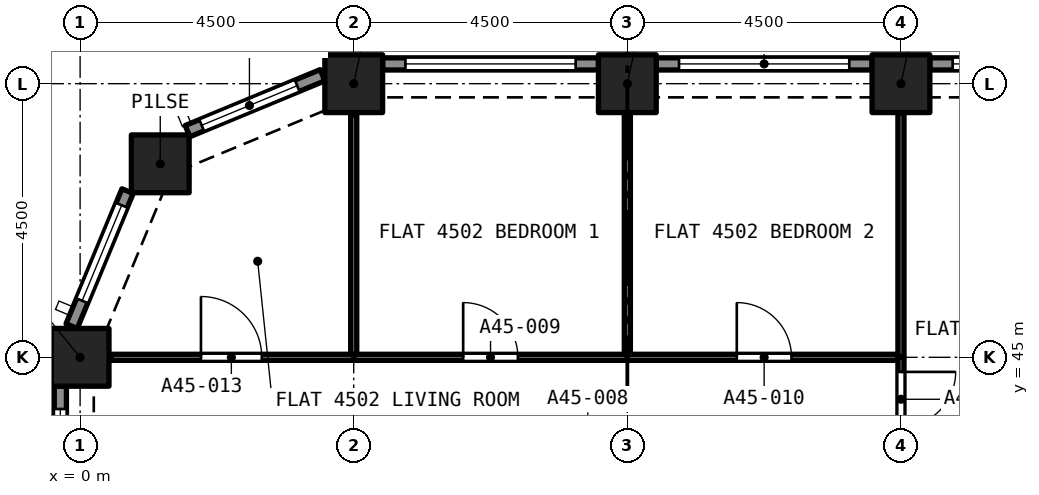
"""IFC4 building model, lengths in metres.
Left out: names, types, materials, properties, quantities, classifications, styles, units other than length and angle.
Written with IfcOpenShell. Run it as: python <this file> out.ifc"""

import sys

from ifc_helpers import new_model, si_unit, direction, frame, frame_2d, origin, origin_2d, place, context, subcontext, project, spatial, rectangle, extrude, element, fill, save


model = new_model("IFC4")
c1 = context("Model", 3, precision=1e-05, world=origin(), true_north=direction((0.0, 1.0)))
c2 = subcontext(c1, "Body", "Model", "MODEL_VIEW")
j1 = project(units=[si_unit("LENGTHUNIT", "METRE"), si_unit("PLANEANGLEUNIT", "RADIAN")], contexts=[c1])
p1 = place(None, origin())
s1 = spatial("IfcSite", under=j1, at=p1, CompositionType="ELEMENT")
p2 = place(p1, origin())
s2 = spatial("IfcBuilding", under=s1, at=p2, CompositionType="ELEMENT")
p3 = place(p2, frame((0.0, 0.0, 163.8)))
s3 = spatial("IfcBuildingStorey", under=s2, at=p3, CompositionType="ELEMENT", Elevation=163.8)
for number, where, z_axis, x_axis in (
    (1, (0.0, 45.0, 0.0), (0.0, 0.0, 1.0), (1.0, 0.0, 0.0)),
    (2, (1.318, 48.182, 0.0), (0.0, 0.0, 1.0), (1.0, 0.0, 0.0)),
    (3, (4.5, 49.5, 0.0), (0.0, 0.0, 1.0), (1.0, 0.0, 0.0)),
    (4, (9.0, 49.5, 0.0), (0.0, 0.0, 1.0), (1.0, 0.0, 0.0)),
    (5, (13.5, 49.5, 0.0), (0.0, 0.0, 1.0), (1.0, 0.0, 0.0)),
):
    element("IfcColumn", number, at=place(p3, frame(where, z_axis=z_axis, x_axis=x_axis)), inside=s3, PredefinedType="COLUMN", context=c2, shape_type="SweptSolid", body=[
        extrude(rectangle(XDim=0.95, YDim=0.95, at=origin_2d()), origin(), (0.0, 0.0, 1.0), 4.4),
    ])
p4 = place(p3, frame((13.975, 49.825, 0.0), z_axis=(0.0, 0.0, 1.0), x_axis=(1.0, 0.0, 0.0)))
e6 = element("IfcWall", 6, at=p4, inside=s3, PredefinedType="SOLIDWALL", context=c2, shape_type="SweptSolid", body=[
    extrude(rectangle(XDim=3.55, YDim=0.2, at=frame_2d((1.775, 0.0))), origin(), (0.0, 0.0, 1.0), 4.4),
])
p5 = place(p4, frame((0.375, 0.0, 0.45)))
e7 = element("IfcOpeningElement", 7, at=p5, cuts=e6, PredefinedType="OPENING", context=c2, shape_type="SweptSolid", body=[
    extrude(rectangle(XDim=2.8, YDim=2.55, at=frame_2d((1.4, 1.275))), frame((0.0, 0.11, 0.0), z_axis=(0.0, -1.0, 0.0), x_axis=(1.0, 0.0, 0.0)), (0.0, 0.0, 1.0), 0.22),
])
p6 = place(p3, frame((9.475, 49.825, 0.0), z_axis=(0.0, 0.0, 1.0), x_axis=(1.0, 0.0, 0.0)))
e8 = element("IfcWall", 8, at=p6, inside=s3, PredefinedType="SOLIDWALL", context=c2, shape_type="SweptSolid", body=[
    extrude(rectangle(XDim=3.55, YDim=0.2, at=frame_2d((1.775, 0.0))), origin(), (0.0, 0.0, 1.0), 4.4),
])
p7 = place(p6, frame((0.375, 0.0, 0.45)))
e9 = element("IfcOpeningElement", 9, at=p7, cuts=e8, PredefinedType="OPENING", context=c2, shape_type="SweptSolid", body=[
    extrude(rectangle(XDim=2.8, YDim=2.55, at=frame_2d((1.4, 1.275))), frame((0.0, 0.11, 0.0), z_axis=(0.0, -1.0, 0.0), x_axis=(1.0, 0.0, 0.0)), (0.0, 0.0, 1.0), 0.22),
])
p8 = place(p3, frame((4.975, 49.825, 0.0), z_axis=(0.0, 0.0, 1.0), x_axis=(1.0, 0.0, 0.0)))
e10 = element("IfcWall", 10, at=p8, inside=s3, PredefinedType="SOLIDWALL", context=c2, shape_type="SweptSolid", body=[
    extrude(rectangle(XDim=3.55, YDim=0.2, at=frame_2d((1.775, 0.0))), origin(), (0.0, 0.0, 1.0), 4.4),
])
p9 = place(p8, frame((0.375, 0.0, 0.45)))
e11 = element("IfcOpeningElement", 11, at=p9, cuts=e10, PredefinedType="OPENING", context=c2, shape_type="SweptSolid", body=[
    extrude(rectangle(XDim=2.8, YDim=2.55, at=frame_2d((1.4, 1.275))), frame((0.0, 0.11, 0.0), z_axis=(0.0, -1.0, 0.0), x_axis=(1.0, 0.0, 0.0)), (0.0, 0.0, 1.0), 0.22),
])
p10 = place(p3, frame((1.767, 48.72, 0.0), z_axis=(0.0, 0.0, 1.0), x_axis=(0.923880599843, 0.382680855588, 0.0)))
e12 = element("IfcWall", 12, at=p10, inside=s3, PredefinedType="SOLIDWALL", context=c2, shape_type="SweptSolid", body=[
    extrude(rectangle(XDim=2.403, YDim=0.2, at=frame_2d((1.201, 0.0))), origin(), (0.0, 0.0, 1.0), 4.4),
])
p11 = place(p10, frame((0.251, 0.0, 0.45)))
e13 = element("IfcOpeningElement", 13, at=p11, cuts=e12, PredefinedType="OPENING", context=c2, shape_type="SweptSolid", body=[
    extrude(rectangle(XDim=1.7, YDim=2.55, at=frame_2d((0.85, 1.275))), frame((0.0, 0.11, 0.0), z_axis=(0.0, -1.0, 0.0), x_axis=(1.0, 0.0, 0.0)), (0.0, 0.0, 1.0), 0.22),
])
p12 = place(p3, frame((-0.139, 45.513, 0.0), z_axis=(0.0, 0.0, 1.0), x_axis=(0.382680855588, 0.923880599843, 0.0)))
e14 = element("IfcWall", 14, at=p12, inside=s3, PredefinedType="SOLIDWALL", context=c2, shape_type="SweptSolid", body=[
    extrude(rectangle(XDim=2.403, YDim=0.2, at=frame_2d((1.201, 0.0))), origin(), (0.0, 0.0, 1.0), 4.4),
])
p13 = place(p12, frame((0.451, 0.0, 0.45)))
e15 = element("IfcOpeningElement", 15, at=p13, cuts=e14, PredefinedType="OPENING", context=c2, shape_type="SweptSolid", body=[
    extrude(rectangle(XDim=1.7, YDim=2.55, at=frame_2d((0.85, 1.275))), frame((0.0, 0.11, 0.0), z_axis=(0.0, -1.0, 0.0), x_axis=(1.0, 0.0, 0.0)), (0.0, 0.0, 1.0), 0.22),
])
p14 = place(p3, frame((-0.325, 40.975, 0.0), z_axis=(0.0, 0.0, 1.0), x_axis=(0.0, 1.0, 0.0)))
e16 = element("IfcWall", 16, at=p14, inside=s3, PredefinedType="SOLIDWALL", context=c2, shape_type="SweptSolid", body=[
    extrude(rectangle(XDim=3.55, YDim=0.2, at=frame_2d((1.775, 0.0))), origin(), (0.0, 0.0, 1.0), 4.4),
])
p15 = place(p14, frame((0.375, 0.0, 0.45)))
e17 = element("IfcOpeningElement", 17, at=p15, cuts=e16, PredefinedType="OPENING", context=c2, shape_type="SweptSolid", body=[
    extrude(rectangle(XDim=2.8, YDim=2.55, at=frame_2d((1.4, 1.275))), frame((0.0, 0.11, 0.0), z_axis=(0.0, -1.0, 0.0), x_axis=(1.0, 0.0, 0.0)), (0.0, 0.0, 1.0), 0.22),
])
p16 = place(p3, frame((9.0, 45.05, 0.0), z_axis=(0.0, 0.0, 1.0), x_axis=(0.0, 1.0, 0.0)))
e18 = element("IfcWall", 18, at=p16, inside=s3, PredefinedType="PARTITIONING", context=c2, shape_type="SweptSolid", body=[
    extrude(rectangle(XDim=3.975, YDim=0.1, at=frame_2d((1.987, 0.0))), origin(), (0.0, 0.0, 1.0), 4.1),
])
p17 = place(p3, frame((4.5, 45.0, 0.0), z_axis=(0.0, 0.0, 1.0), x_axis=(1.0, 0.0, 0.0)))
e19 = element("IfcWall", 19, at=p17, inside=s3, PredefinedType="PARTITIONING", context=c2, shape_type="SweptSolid", body=[
    extrude(rectangle(XDim=4.5, YDim=0.1, at=frame_2d((2.25, 0.0))), origin(), (0.0, 0.0, 1.0), 4.1),
])
p18 = place(p17, frame((1.8, 0.0, 0.0)))
e20 = element("IfcOpeningElement", 20, at=p18, cuts=e19, PredefinedType="OPENING", context=c2, shape_type="SweptSolid", body=[
    extrude(rectangle(XDim=0.9, YDim=2.1, at=frame_2d((0.45, 1.05))), frame((0.0, 0.06, 0.0), z_axis=(0.0, -1.0, 0.0), x_axis=(1.0, 0.0, 0.0)), (0.0, 0.0, 1.0), 0.12),
])
p19 = place(p3, frame((4.5, 45.05, 0.0), z_axis=(0.0, 0.0, 1.0), x_axis=(0.0, 1.0, 0.0)))
e21 = element("IfcWall", 21, at=p19, inside=s3, PredefinedType="PARTITIONING", context=c2, shape_type="SweptSolid", body=[
    extrude(rectangle(XDim=3.936, YDim=0.1, at=frame_2d((1.968, 0.0))), origin(), (0.0, 0.0, 1.0), 4.1),
])
p20 = place(p3, frame((13.5, 45.0, 0.0), z_axis=(0.0, 0.0, 1.0), x_axis=(0.0, 1.0, 0.0)))
e22 = element("IfcWall", 22, at=p20, inside=s3, PredefinedType="PARTITIONING", context=c2, shape_type="SweptSolid", body=[
    extrude(rectangle(XDim=4.025, YDim=0.1, at=frame_2d((2.012, 0.0))), origin(), (0.0, 0.0, 1.0), 4.1),
])
p21 = place(p3, frame((9.0, 45.0, 0.0), z_axis=(0.0, 0.0, 1.0), x_axis=(1.0, 0.0, 0.0)))
e23 = element("IfcWall", 23, at=p21, inside=s3, PredefinedType="PARTITIONING", context=c2, shape_type="SweptSolid", body=[
    extrude(rectangle(XDim=4.45, YDim=0.1, at=frame_2d((2.225, 0.0))), origin(), (0.0, 0.0, 1.0), 4.1),
])
p22 = place(p21, frame((1.8, 0.0, 0.0)))
e24 = element("IfcOpeningElement", 24, at=p22, cuts=e23, PredefinedType="OPENING", context=c2, shape_type="SweptSolid", body=[
    extrude(rectangle(XDim=0.9, YDim=2.1, at=frame_2d((0.45, 1.05))), frame((0.0, 0.06, 0.0), z_axis=(0.0, -1.0, 0.0), x_axis=(1.0, 0.0, 0.0)), (0.0, 0.0, 1.0), 0.12),
])
p23 = place(p3, frame((13.5, 45.0, 0.0), z_axis=(0.0, 0.0, 1.0), x_axis=(0.0, -1.0, 0.0)))
e25 = element("IfcWall", 25, at=p23, inside=s3, PredefinedType="PARTITIONING", context=c2, shape_type="SweptSolid", body=[
    extrude(rectangle(XDim=1.38, YDim=0.1, at=frame_2d((0.69, 0.0))), origin(), (0.0, 0.0, 1.0), 4.1),
])
p24 = place(p23, frame((0.24, 0.0, 0.0)))
e26 = element("IfcOpeningElement", 26, at=p24, cuts=e25, PredefinedType="OPENING", context=c2, shape_type="SweptSolid", body=[
    extrude(rectangle(XDim=0.9, YDim=2.1, at=frame_2d((0.45, 1.05))), frame((0.0, 0.06, 0.0), z_axis=(0.0, -1.0, 0.0), x_axis=(1.0, 0.0, 0.0)), (0.0, 0.0, 1.0), 0.12),
])
p25 = place(p3, frame((0.514, 45.0, 0.0), z_axis=(0.0, 0.0, 1.0), x_axis=(1.0, 0.0, 0.0)))
e27 = element("IfcWall", 27, at=p25, inside=s3, PredefinedType="PARTITIONING", context=c2, shape_type="SweptSolid", body=[
    extrude(rectangle(XDim=3.986, YDim=0.1, at=frame_2d((1.993, 0.0))), origin(), (0.0, 0.0, 1.0), 4.1),
])
p26 = place(p25, frame((1.473, 0.0, 0.0)))
e28 = element("IfcOpeningElement", 28, at=p26, cuts=e27, PredefinedType="OPENING", context=c2, shape_type="SweptSolid", body=[
    extrude(rectangle(XDim=1.0, YDim=2.1, at=frame_2d((0.5, 1.05))), frame((0.0, 0.06, 0.0), z_axis=(0.0, -1.0, 0.0), x_axis=(1.0, 0.0, 0.0)), (0.0, 0.0, 1.0), 0.12),
])
p27 = place(p5, origin())
e29 = element("IfcWindow", 29, at=p27, inside=s3, PartitioningType="SINGLE_PANEL", PredefinedType="WINDOW", context=c2, shape_type="SweptSolid", body=[
    extrude(rectangle(XDim=2.8, YDim=2.55, at=frame_2d((1.4, 1.275))), frame((0.0, 0.03, 0.0), z_axis=(0.0, -1.0, 0.0), x_axis=(1.0, 0.0, 0.0)), (0.0, 0.0, 1.0), 0.06),
])
fill(e7, e29)
p28 = place(p7, origin())
e30 = element("IfcWindow", 30, at=p28, inside=s3, PartitioningType="SINGLE_PANEL", PredefinedType="WINDOW", context=c2, shape_type="SweptSolid", body=[
    extrude(rectangle(XDim=2.8, YDim=2.55, at=frame_2d((1.4, 1.275))), frame((0.0, 0.03, 0.0), z_axis=(0.0, -1.0, 0.0), x_axis=(1.0, 0.0, 0.0)), (0.0, 0.0, 1.0), 0.06),
])
fill(e9, e30)
p29 = place(p9, origin())
e31 = element("IfcWindow", 31, at=p29, inside=s3, PartitioningType="SINGLE_PANEL", PredefinedType="WINDOW", context=c2, shape_type="SweptSolid", body=[
    extrude(rectangle(XDim=2.8, YDim=2.55, at=frame_2d((1.4, 1.275))), frame((0.0, 0.03, 0.0), z_axis=(0.0, -1.0, 0.0), x_axis=(1.0, 0.0, 0.0)), (0.0, 0.0, 1.0), 0.06),
])
fill(e11, e31)
p30 = place(p11, origin())
e32 = element("IfcWindow", 32, at=p30, inside=s3, PartitioningType="SINGLE_PANEL", PredefinedType="WINDOW", context=c2, shape_type="SweptSolid", body=[
    extrude(rectangle(XDim=1.7, YDim=2.55, at=frame_2d((0.85, 1.275))), frame((0.0, 0.03, 0.0), z_axis=(0.0, -1.0, 0.0), x_axis=(1.0, 0.0, 0.0)), (0.0, 0.0, 1.0), 0.06),
])
fill(e13, e32)
p31 = place(p13, origin())
e33 = element("IfcWindow", 33, at=p31, inside=s3, PartitioningType="SINGLE_PANEL", PredefinedType="WINDOW", context=c2, shape_type="SweptSolid", body=[
    extrude(rectangle(XDim=1.7, YDim=2.55, at=frame_2d((0.85, 1.275))), frame((0.0, 0.03, 0.0), z_axis=(0.0, -1.0, 0.0), x_axis=(1.0, 0.0, 0.0)), (0.0, 0.0, 1.0), 0.06),
])
fill(e15, e33)
p32 = place(p15, origin())
e34 = element("IfcWindow", 34, at=p32, inside=s3, PartitioningType="SINGLE_PANEL", PredefinedType="WINDOW", context=c2, shape_type="SweptSolid", body=[
    extrude(rectangle(XDim=2.8, YDim=2.55, at=frame_2d((1.4, 1.275))), frame((0.0, 0.03, 0.0), z_axis=(0.0, -1.0, 0.0), x_axis=(1.0, 0.0, 0.0)), (0.0, 0.0, 1.0), 0.06),
])
fill(e17, e34)
p33 = place(p18, origin())
e35 = element("IfcDoor", 35, at=p33, inside=s3, OperationType="SINGLE_SWING_LEFT", PredefinedType="DOOR", context=c2, shape_type="SweptSolid", body=[
    extrude(rectangle(XDim=0.9, YDim=2.1, at=frame_2d((0.45, 1.05))), frame((0.0, 0.025, 0.0), z_axis=(0.0, -1.0, 0.0), x_axis=(1.0, 0.0, 0.0)), (0.0, 0.0, 1.0), 0.05),
])
fill(e20, e35)
p34 = place(p22, origin())
e36 = element("IfcDoor", 36, at=p34, inside=s3, OperationType="SINGLE_SWING_RIGHT", PredefinedType="DOOR", context=c2, shape_type="SweptSolid", body=[
    extrude(rectangle(XDim=0.9, YDim=2.1, at=frame_2d((0.45, 1.05))), frame((0.0, 0.025, 0.0), z_axis=(0.0, -1.0, 0.0), x_axis=(1.0, 0.0, 0.0)), (0.0, 0.0, 1.0), 0.05),
])
fill(e24, e36)
p35 = place(p24, origin())
e37 = element("IfcDoor", 37, at=p35, inside=s3, OperationType="SINGLE_SWING_LEFT", PredefinedType="DOOR", context=c2, shape_type="SweptSolid", body=[
    extrude(rectangle(XDim=0.9, YDim=2.1, at=frame_2d((0.45, 1.05))), frame((0.0, 0.025, 0.0), z_axis=(0.0, -1.0, 0.0), x_axis=(1.0, 0.0, 0.0)), (0.0, 0.0, 1.0), 0.05),
])
fill(e26, e37)
p36 = place(p26, origin())
e38 = element("IfcDoor", 38, at=p36, inside=s3, OperationType="SINGLE_SWING_LEFT", PredefinedType="DOOR", context=c2, shape_type="SweptSolid", body=[
    extrude(rectangle(XDim=1.0, YDim=2.1, at=frame_2d((0.5, 1.05))), frame((0.0, 0.025, 0.0), z_axis=(0.0, -1.0, 0.0), x_axis=(1.0, 0.0, 0.0)), (0.0, 0.0, 1.0), 0.05),
])
fill(e28, e38)
save(model, sys.argv[1])
